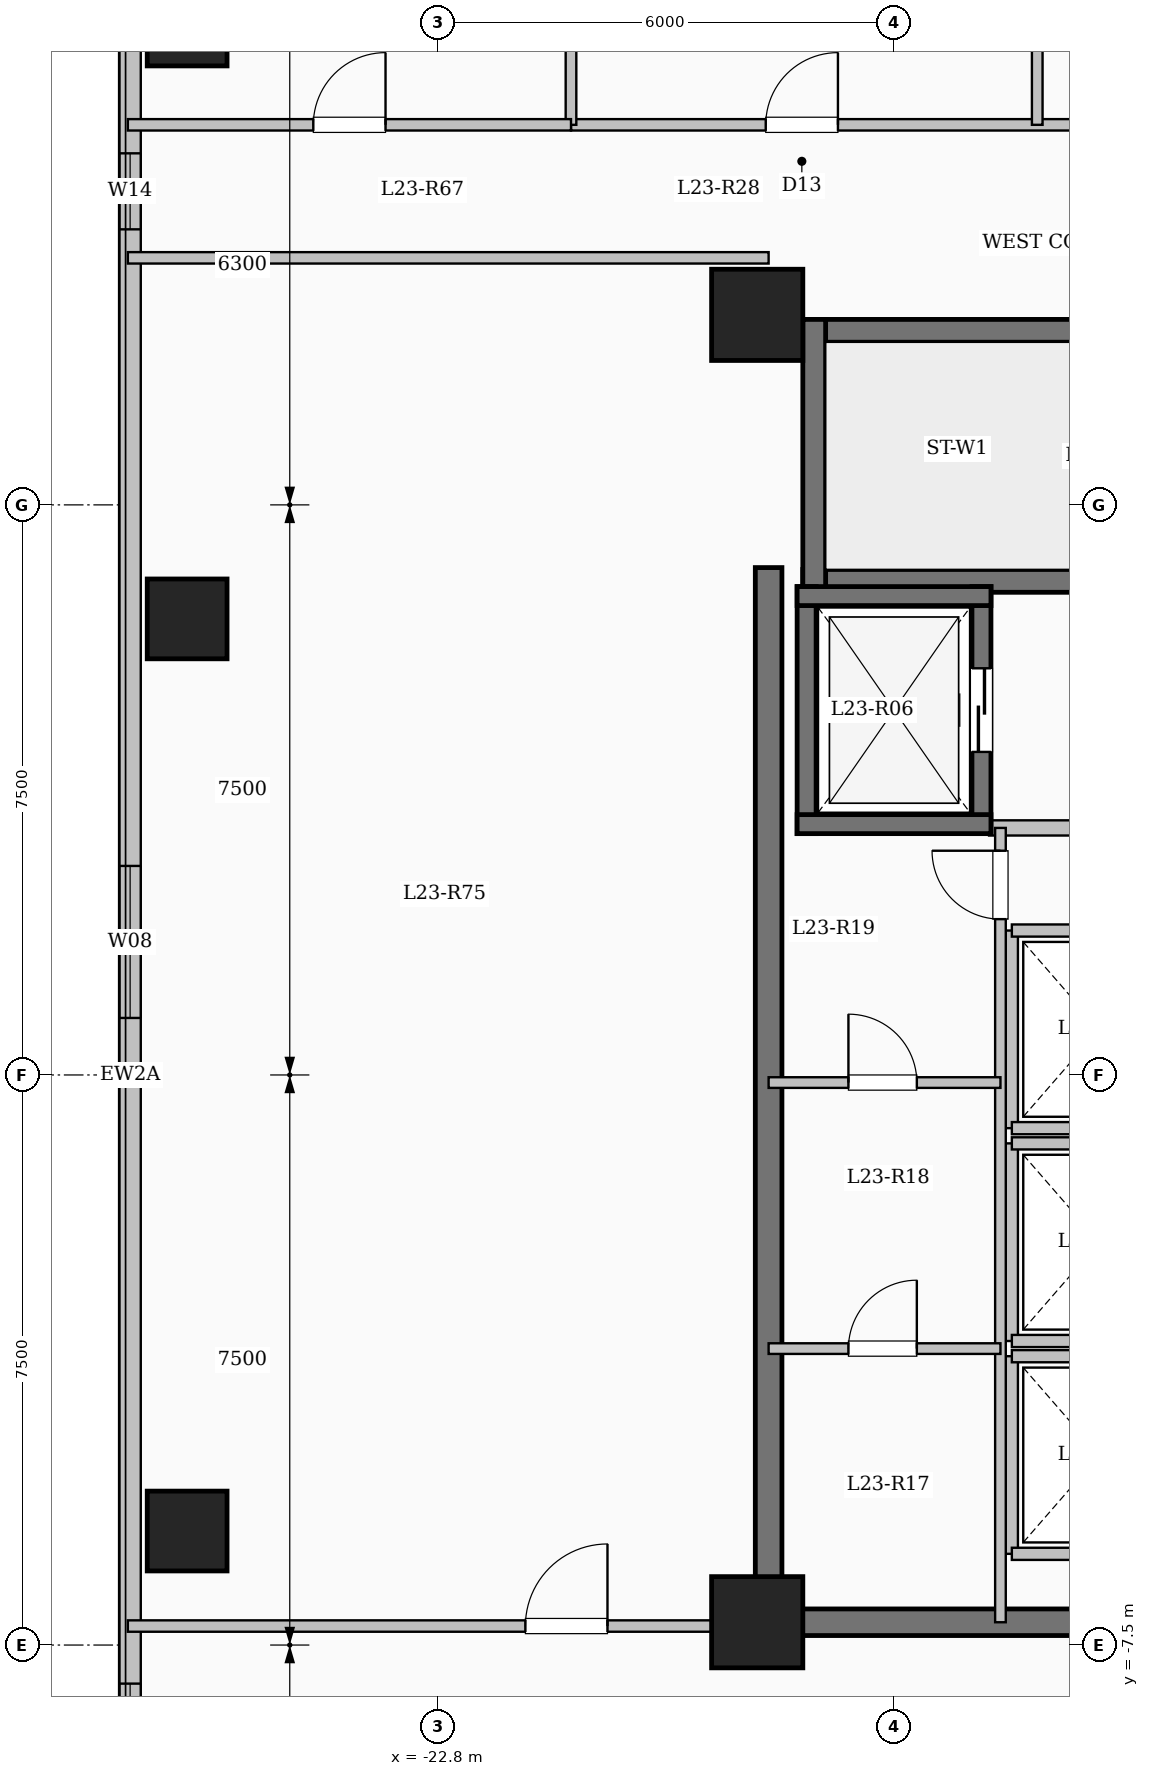
"""IFC4 building model, lengths in metres.
Left out: names, types, materials, properties, quantities, classifications, styles, units other than length and angle.
Written with IfcOpenShell. Run it as: python <this file> out.ifc"""

import sys

from ifc_helpers import new_model, si_unit, direction, frame, frame_2d, origin, origin_2d, place, context, subcontext, project, spatial, rectangle, extrude, element, fill, save


model = new_model("IFC4")
c1 = context("Model", 3, precision=1e-05, world=origin(), true_north=direction((0.0, 1.0)))
c2 = subcontext(c1, "Body", "Model", "MODEL_VIEW")
j1 = project(units=[si_unit("LENGTHUNIT", "METRE"), si_unit("PLANEANGLEUNIT", "RADIAN")], contexts=[c1])
p1 = place(None, origin())
s1 = spatial("IfcSite", under=j1, at=p1, CompositionType="ELEMENT")
p2 = place(p1, origin())
s2 = spatial("IfcBuilding", under=s1, at=p2, CompositionType="ELEMENT")
p3 = place(p2, frame((0.0, 0.0, 88.35)))
s3 = spatial("IfcBuildingStorey", under=s2, at=p3, CompositionType="ELEMENT", Elevation=88.35)
for number, where, z_axis, x_axis in (
    (1, (-18.6, -7.2, 0.0), (0.0, 0.0, 1.0), (1.0, 0.0, 0.0)),
    (2, (-18.6, 10.0, 0.0), (0.0, 0.0, 1.0), (1.0, 0.0, 0.0)),
):
    element("IfcColumn", number, at=place(p3, frame(where, z_axis=z_axis, x_axis=x_axis)), inside=s3, PredefinedType="COLUMN", context=c2, shape_type="SweptSolid", body=[
        extrude(rectangle(XDim=1.2, YDim=1.2, at=origin_2d()), origin(), (0.0, 0.0, 1.0), 3.35),
    ])
for number, where, z_axis, x_axis in (
    (3, (-26.1, -6.0, 0.0), (0.0, 0.0, 1.0), (1.0, 0.0, 0.0)),
    (4, (-26.1, 6.0, 0.0), (0.0, 0.0, 1.0), (1.0, 0.0, 0.0)),
    (5, (-26.1, 13.8, 0.0), (0.0, 0.0, 1.0), (1.0, 0.0, 0.0)),
):
    element("IfcColumn", number, at=place(p3, frame(where, z_axis=z_axis, x_axis=x_axis)), inside=s3, PredefinedType="COLUMN", context=c2, shape_type="SweptSolid", body=[
        extrude(rectangle(XDim=1.05, YDim=1.05, at=origin_2d()), origin(), (0.0, 0.0, 1.0), 3.35),
    ])
p4 = place(p3, frame((-26.85, -17.85, 0.0), z_axis=(0.0, 0.0, 1.0), x_axis=(0.0, 1.0, 0.0)))
e6 = element("IfcWall", 6, at=p4, inside=s3, PredefinedType="SOLIDWALL", context=c2, shape_type="SweptSolid", body=[
    extrude(rectangle(XDim=35.7, YDim=0.28, at=frame_2d((17.85, 0.0))), origin(), (0.0, 0.0, 1.0), 3.1),
])
p5 = place(p4, frame((2.55, 0.0, 0.9)))
e7 = element("IfcOpeningElement", 7, at=p5, cuts=e6, PredefinedType="OPENING", context=c2, shape_type="SweptSolid", body=[
    extrude(rectangle(XDim=2.4, YDim=1.8, at=frame_2d((1.2, 0.9))), frame((0.0, 0.15, 0.0), z_axis=(0.0, -1.0, 0.0), x_axis=(1.0, 0.0, 0.0)), (0.0, 0.0, 1.0), 0.3),
])
p6 = place(p4, frame((8.343, 0.0, 0.9)))
e8 = element("IfcOpeningElement", 8, at=p6, cuts=e6, PredefinedType="OPENING", context=c2, shape_type="SweptSolid", body=[
    extrude(rectangle(XDim=1.5, YDim=1.65, at=frame_2d((0.75, 0.825))), frame((0.0, 0.15, 0.0), z_axis=(0.0, -1.0, 0.0), x_axis=(1.0, 0.0, 0.0)), (0.0, 0.0, 1.0), 0.3),
])
p7 = place(p4, frame((18.6, 0.0, 0.9)))
e9 = element("IfcOpeningElement", 9, at=p7, cuts=e6, PredefinedType="OPENING", context=c2, shape_type="SweptSolid", body=[
    extrude(rectangle(XDim=2.0, YDim=1.7, at=frame_2d((1.0, 0.85))), frame((0.0, 0.15, 0.0), z_axis=(0.0, -1.0, 0.0), x_axis=(1.0, 0.0, 0.0)), (0.0, 0.0, 1.0), 0.3),
])
p8 = place(p4, frame((28.975, 0.0, 0.95)))
e10 = element("IfcOpeningElement", 10, at=p8, cuts=e6, PredefinedType="OPENING", context=c2, shape_type="SweptSolid", body=[
    extrude(rectangle(XDim=1.0, YDim=1.5, at=frame_2d((0.5, 0.75))), frame((0.0, 0.15, 0.0), z_axis=(0.0, -1.0, 0.0), x_axis=(1.0, 0.0, 0.0)), (0.0, 0.0, 1.0), 0.3),
])
p9 = place(p4, frame((32.025, 0.0, 0.9)))
e11 = element("IfcOpeningElement", 11, at=p9, cuts=e6, PredefinedType="OPENING", context=c2, shape_type="SweptSolid", body=[
    extrude(rectangle(XDim=2.0, YDim=1.7, at=frame_2d((1.0, 0.85))), frame((0.0, 0.15, 0.0), z_axis=(0.0, -1.0, 0.0), x_axis=(1.0, 0.0, 0.0)), (0.0, 0.0, 1.0), 0.3),
])
p10 = place(p3, frame((-18.0, 9.79, 0.0), z_axis=(0.0, 0.0, 1.0), x_axis=(1.0, 0.0, 0.0)))
e12 = element("IfcWall", 12, at=p10, inside=s3, PredefinedType="SHEAR", context=c2, shape_type="SweptSolid", body=[
    extrude(rectangle(XDim=8.0, YDim=0.3, at=frame_2d((4.0, 0.0))), origin(), (0.0, 0.0, 1.0), 3.35),
])
p11 = place(p3, frame((-18.0, 6.5, 0.0), z_axis=(0.0, 0.0, 1.0), x_axis=(1.0, 0.0, 0.0)))
e13 = element("IfcWall", 13, at=p11, inside=s3, PredefinedType="SHEAR", context=c2, shape_type="SweptSolid", body=[
    extrude(rectangle(XDim=8.0, YDim=0.3, at=frame_2d((4.0, 0.0))), origin(), (0.0, 0.0, 1.0), 3.35),
])
p12 = place(p11, frame((6.45, 0.0, 0.0)))
e14 = element("IfcOpeningElement", 14, at=p12, cuts=e13, PredefinedType="OPENING", context=c2, shape_type="SweptSolid", body=[
    extrude(rectangle(XDim=1.0, YDim=2.15, at=frame_2d((0.5, 1.075))), frame((0.0, 0.16, 0.0), z_axis=(0.0, -1.0, 0.0), x_axis=(1.0, 0.0, 0.0)), (0.0, 0.0, 1.0), 0.32),
])
p13 = place(p3, frame((-17.85, 6.35, 0.0), z_axis=(0.0, 0.0, 1.0), x_axis=(0.0, 1.0, 0.0)))
e15 = element("IfcWall", 15, at=p13, inside=s3, PredefinedType="SHEAR", context=c2, shape_type="SweptSolid", body=[
    extrude(rectangle(XDim=3.59, YDim=0.3, at=frame_2d((1.795, 0.0))), origin(), (0.0, 0.0, 1.0), 3.35),
])
p14 = place(p3, frame((-15.55, 3.25, 0.0), z_axis=(0.0, 0.0, 1.0), x_axis=(1.0, 0.0, 0.0)))
e16 = element("IfcWall", 16, at=p14, inside=s3, PredefinedType="SOLIDWALL", context=c2, shape_type="SweptSolid", body=[
    extrude(rectangle(XDim=5.4, YDim=0.2, at=frame_2d((2.7, 0.0))), origin(), (0.0, 0.0, 1.0), 3.1),
])
p15 = place(p3, frame((-17.95, 3.175, 0.0), z_axis=(0.0, 0.0, 1.0), x_axis=(0.0, 1.0, 0.0)))
e17 = element("IfcWall", 17, at=p15, inside=s3, PredefinedType="SHEAR", context=c2, shape_type="SweptSolid", body=[
    extrude(rectangle(XDim=3.25, YDim=0.25, at=frame_2d((1.625, 0.0))), origin(), (0.0, 0.0, 1.0), 3.35),
])
p16 = place(p3, frame((-15.65, 3.175, 0.0), z_axis=(0.0, 0.0, 1.0), x_axis=(0.0, 1.0, 0.0)))
e18 = element("IfcWall", 18, at=p16, inside=s3, PredefinedType="SHEAR", context=c2, shape_type="SweptSolid", body=[
    extrude(rectangle(XDim=3.25, YDim=0.25, at=frame_2d((1.625, 0.0))), origin(), (0.0, 0.0, 1.0), 3.35),
])
p17 = place(p16, frame((1.075, 0.0, 0.0)))
e19 = element("IfcOpeningElement", 19, at=p17, cuts=e18, PredefinedType="OPENING", context=c2, shape_type="SweptSolid", body=[
    extrude(rectangle(XDim=1.1, YDim=2.15, at=frame_2d((0.55, 1.075))), frame((0.0, 0.135, 0.0), z_axis=(0.0, -1.0, 0.0), x_axis=(1.0, 0.0, 0.0)), (0.0, 0.0, 1.0), 0.27),
])
for number, where, z_axis, x_axis in (
    (20, (-18.075, 3.3, 0.0), (0.0, 0.0, 1.0), (1.0, 0.0, 0.0)),
    (21, (-18.075, 6.3, 0.0), (0.0, 0.0, 1.0), (1.0, 0.0, 0.0)),
):
    element("IfcWall", number, at=place(p3, frame(where, z_axis=z_axis, x_axis=x_axis)), inside=s3, PredefinedType="SHEAR", context=c2, shape_type="SweptSolid", body=[
        extrude(rectangle(XDim=2.55, YDim=0.25, at=frame_2d((1.275, 0.0))), origin(), (0.0, 0.0, 1.0), 3.35),
    ])
p18 = place(p3, frame((-15.25, -6.3, 0.0), z_axis=(0.0, 0.0, 1.0), x_axis=(0.0, 1.0, 0.0)))
e22 = element("IfcWall", 22, at=p18, inside=s3, PredefinedType="SOLIDWALL", context=c2, shape_type="SweptSolid", body=[
    extrude(rectangle(XDim=2.6, YDim=0.16, at=frame_2d((1.3, 0.0))), origin(), (0.0, 0.0, 1.0), 3.1),
])
for number, where, z_axis, x_axis in (
    (23, (-15.25, -6.3, 0.0), (0.0, 0.0, 1.0), (1.0, 0.0, 0.0)),
    (24, (-15.25, -3.7, 0.0), (0.0, 0.0, 1.0), (1.0, 0.0, 0.0)),
):
    element("IfcWall", number, at=place(p3, frame(where, z_axis=z_axis, x_axis=x_axis)), inside=s3, PredefinedType="SOLIDWALL", context=c2, shape_type="SweptSolid", body=[
        extrude(rectangle(XDim=2.3, YDim=0.16, at=frame_2d((1.15, 0.0))), origin(), (0.0, 0.0, 1.0), 3.1),
    ])
p19 = place(p3, frame((-15.25, -3.5, 0.0), z_axis=(0.0, 0.0, 1.0), x_axis=(0.0, 1.0, 0.0)))
e25 = element("IfcWall", 25, at=p19, inside=s3, PredefinedType="SOLIDWALL", context=c2, shape_type="SweptSolid", body=[
    extrude(rectangle(XDim=2.6, YDim=0.16, at=frame_2d((1.3, 0.0))), origin(), (0.0, 0.0, 1.0), 3.1),
])
for number, where, z_axis, x_axis in (
    (26, (-15.25, -3.5, 0.0), (0.0, 0.0, 1.0), (1.0, 0.0, 0.0)),
    (27, (-15.25, -0.9, 0.0), (0.0, 0.0, 1.0), (1.0, 0.0, 0.0)),
):
    element("IfcWall", number, at=place(p3, frame(where, z_axis=z_axis, x_axis=x_axis)), inside=s3, PredefinedType="SOLIDWALL", context=c2, shape_type="SweptSolid", body=[
        extrude(rectangle(XDim=2.3, YDim=0.16, at=frame_2d((1.15, 0.0))), origin(), (0.0, 0.0, 1.0), 3.1),
    ])
p20 = place(p3, frame((-15.25, -0.7, 0.0), z_axis=(0.0, 0.0, 1.0), x_axis=(0.0, 1.0, 0.0)))
e28 = element("IfcWall", 28, at=p20, inside=s3, PredefinedType="SOLIDWALL", context=c2, shape_type="SweptSolid", body=[
    extrude(rectangle(XDim=2.6, YDim=0.16, at=frame_2d((1.3, 0.0))), origin(), (0.0, 0.0, 1.0), 3.1),
])
for number, where, z_axis, x_axis in (
    (29, (-15.25, -0.7, 0.0), (0.0, 0.0, 1.0), (1.0, 0.0, 0.0)),
    (30, (-15.25, 1.9, 0.0), (0.0, 0.0, 1.0), (1.0, 0.0, 0.0)),
):
    element("IfcWall", number, at=place(p3, frame(where, z_axis=z_axis, x_axis=x_axis)), inside=s3, PredefinedType="SOLIDWALL", context=c2, shape_type="SweptSolid", body=[
        extrude(rectangle(XDim=2.3, YDim=0.16, at=frame_2d((1.15, 0.0))), origin(), (0.0, 0.0, 1.0), 3.1),
    ])
p21 = place(p3, frame((-18.45, -7.375, 0.0), z_axis=(0.0, 0.0, 1.0), x_axis=(0.0, 1.0, 0.0)))
e31 = element("IfcWall", 31, at=p21, inside=s3, PredefinedType="SHEAR", context=c2, shape_type="SweptSolid", body=[
    extrude(rectangle(XDim=14.05, YDim=0.35, at=frame_2d((7.025, 0.0))), origin(), (0.0, 0.0, 1.0), 3.35),
])
p22 = place(p3, frame((-18.625, -7.2, 0.0), z_axis=(0.0, 0.0, 1.0), x_axis=(1.0, 0.0, 0.0)))
e32 = element("IfcWall", 32, at=p22, inside=s3, PredefinedType="SHEAR", context=c2, shape_type="SweptSolid", body=[
    extrude(rectangle(XDim=8.55, YDim=0.35, at=frame_2d((4.275, 0.0))), origin(), (0.0, 0.0, 1.0), 3.35),
])
p23 = place(p3, frame((-15.4, -7.2, 0.0), z_axis=(0.0, 0.0, 1.0), x_axis=(0.0, 1.0, 0.0)))
e33 = element("IfcWall", 33, at=p23, inside=s3, PredefinedType="PARTITIONING", context=c2, shape_type="SweptSolid", body=[
    extrude(rectangle(XDim=10.45, YDim=0.14, at=frame_2d((5.225, 0.0))), origin(), (0.0, 0.0, 1.0), 3.1),
])
p24 = place(p23, frame((9.25, 0.0, 0.0)))
e34 = element("IfcOpeningElement", 34, at=p24, cuts=e33, PredefinedType="OPENING", context=c2, shape_type="SweptSolid", body=[
    extrude(rectangle(XDim=0.9, YDim=2.08, at=frame_2d((0.45, 1.04))), frame((0.0, 0.08, 0.0), z_axis=(0.0, -1.0, 0.0), x_axis=(1.0, 0.0, 0.0)), (0.0, 0.0, 1.0), 0.16),
])
p25 = place(p3, frame((-18.45, -3.6, 0.0), z_axis=(0.0, 0.0, 1.0), x_axis=(1.0, 0.0, 0.0)))
e35 = element("IfcWall", 35, at=p25, inside=s3, PredefinedType="PARTITIONING", context=c2, shape_type="SweptSolid", body=[
    extrude(rectangle(XDim=3.05, YDim=0.14, at=frame_2d((1.525, 0.0))), origin(), (0.0, 0.0, 1.0), 3.1),
])
p26 = place(p25, frame((1.05, 0.0, 0.0)))
e36 = element("IfcOpeningElement", 36, at=p26, cuts=e35, PredefinedType="OPENING", context=c2, shape_type="SweptSolid", body=[
    extrude(rectangle(XDim=0.9, YDim=2.08, at=frame_2d((0.45, 1.04))), frame((0.0, 0.08, 0.0), z_axis=(0.0, -1.0, 0.0), x_axis=(1.0, 0.0, 0.0)), (0.0, 0.0, 1.0), 0.16),
])
p27 = place(p3, frame((-18.45, -0.1, 0.0), z_axis=(0.0, 0.0, 1.0), x_axis=(1.0, 0.0, 0.0)))
e37 = element("IfcWall", 37, at=p27, inside=s3, PredefinedType="PARTITIONING", context=c2, shape_type="SweptSolid", body=[
    extrude(rectangle(XDim=3.05, YDim=0.14, at=frame_2d((1.525, 0.0))), origin(), (0.0, 0.0, 1.0), 3.1),
])
p28 = place(p27, frame((1.05, 0.0, 0.0)))
e38 = element("IfcOpeningElement", 38, at=p28, cuts=e37, PredefinedType="OPENING", context=c2, shape_type="SweptSolid", body=[
    extrude(rectangle(XDim=0.9, YDim=2.08, at=frame_2d((0.45, 1.04))), frame((0.0, 0.08, 0.0), z_axis=(0.0, -1.0, 0.0), x_axis=(1.0, 0.0, 0.0)), (0.0, 0.0, 1.0), 0.16),
])
p29 = place(p3, frame((-21.05, 12.5, 0.0), z_axis=(0.0, 0.0, 1.0), x_axis=(1.0, 0.0, 0.0)))
e39 = element("IfcWall", 39, at=p29, inside=s3, PredefinedType="PARTITIONING", context=c2, shape_type="SweptSolid", body=[
    extrude(rectangle(XDim=17.2, YDim=0.15, at=frame_2d((8.6, 0.0))), origin(), (0.0, 0.0, 1.0), 3.1),
])
p30 = place(p29, frame((2.562, 0.0, 0.0)))
e40 = element("IfcOpeningElement", 40, at=p30, cuts=e39, PredefinedType="OPENING", context=c2, shape_type="SweptSolid", body=[
    extrude(rectangle(XDim=0.95, YDim=2.15, at=frame_2d((0.475, 1.075))), frame((0.0, 0.085, 0.0), z_axis=(0.0, -1.0, 0.0), x_axis=(1.0, 0.0, 0.0)), (0.0, 0.0, 1.0), 0.17),
])
p31 = place(p29, frame((8.726, 0.0, 0.0)))
e41 = element("IfcOpeningElement", 41, at=p31, cuts=e39, PredefinedType="OPENING", context=c2, shape_type="SweptSolid", body=[
    extrude(rectangle(XDim=0.95, YDim=2.15, at=frame_2d((0.475, 1.075))), frame((0.0, 0.085, 0.0), z_axis=(0.0, -1.0, 0.0), x_axis=(1.0, 0.0, 0.0)), (0.0, 0.0, 1.0), 0.17),
])
p32 = place(p29, frame((14.21, 0.0, 0.0)))
e42 = element("IfcOpeningElement", 42, at=p32, cuts=e39, PredefinedType="OPENING", context=c2, shape_type="SweptSolid", body=[
    extrude(rectangle(XDim=0.95, YDim=2.15, at=frame_2d((0.475, 1.075))), frame((0.0, 0.085, 0.0), z_axis=(0.0, -1.0, 0.0), x_axis=(1.0, 0.0, 0.0)), (0.0, 0.0, 1.0), 0.17),
])
p33 = place(p3, frame((-14.916, 12.5, 0.0), z_axis=(0.0, 0.0, 1.0), x_axis=(0.0, 1.0, 0.0)))
e43 = element("IfcWall", 43, at=p33, inside=s3, PredefinedType="PARTITIONING", context=c2, shape_type="SweptSolid", body=[
    extrude(rectangle(XDim=9.55, YDim=0.14, at=frame_2d((4.775, 0.0))), origin(), (0.0, 0.0, 1.0), 2.435),
])
p34 = place(p3, frame((-26.88, -7.25, 0.0), z_axis=(0.0, 0.0, 1.0), x_axis=(1.0, 0.0, 0.0)))
e44 = element("IfcWall", 44, at=p34, inside=s3, PredefinedType="PARTITIONING", context=c2, shape_type="SweptSolid", body=[
    extrude(rectangle(XDim=8.43, YDim=0.15, at=frame_2d((4.215, 0.0))), origin(), (0.0, 0.0, 1.0), 3.1),
])
p35 = place(p34, frame((5.23, 0.0, 0.0)))
e45 = element("IfcOpeningElement", 45, at=p35, cuts=e44, PredefinedType="OPENING", context=c2, shape_type="SweptSolid", body=[
    extrude(rectangle(XDim=1.08, YDim=2.15, at=frame_2d((0.54, 1.075))), frame((0.0, 0.085, 0.0), z_axis=(0.0, -1.0, 0.0), x_axis=(1.0, 0.0, 0.0)), (0.0, 0.0, 1.0), 0.17),
])
p36 = place(p3, frame((-26.88, 10.75, 0.0), z_axis=(0.0, 0.0, 1.0), x_axis=(1.0, 0.0, 0.0)))
e46 = element("IfcWall", 46, at=p36, inside=s3, PredefinedType="PARTITIONING", context=c2, shape_type="SweptSolid", body=[
    extrude(rectangle(XDim=8.43, YDim=0.15, at=frame_2d((4.215, 0.0))), origin(), (0.0, 0.0, 1.0), 3.1),
])
p37 = place(p3, frame((-21.05, 12.5, 0.0), z_axis=(0.0, 0.0, 1.0), x_axis=(0.0, 1.0, 0.0)))
e47 = element("IfcWall", 47, at=p37, inside=s3, PredefinedType="PARTITIONING", context=c2, shape_type="SweptSolid", body=[
    extrude(rectangle(XDim=5.35, YDim=0.14, at=frame_2d((2.675, 0.0))), origin(), (0.0, 0.0, 1.0), 3.1),
])
p38 = place(p3, frame((-26.88, 12.5, 0.0), z_axis=(0.0, 0.0, 1.0), x_axis=(1.0, 0.0, 0.0)))
e48 = element("IfcWall", 48, at=p38, inside=s3, PredefinedType="PARTITIONING", context=c2, shape_type="SweptSolid", body=[
    extrude(rectangle(XDim=5.83, YDim=0.15, at=frame_2d((2.915, 0.0))), origin(), (0.0, 0.0, 1.0), 3.1),
])
p39 = place(p38, frame((2.44, 0.0, 0.0)))
e49 = element("IfcOpeningElement", 49, at=p39, cuts=e48, PredefinedType="OPENING", context=c2, shape_type="SweptSolid", body=[
    extrude(rectangle(XDim=0.95, YDim=2.15, at=frame_2d((0.475, 1.075))), frame((0.0, 0.085, 0.0), z_axis=(0.0, -1.0, 0.0), x_axis=(1.0, 0.0, 0.0)), (0.0, 0.0, 1.0), 0.17),
])
p40 = place(p6, origin())
e50 = element("IfcWindow", 50, at=p40, inside=s3, PartitioningType="SINGLE_PANEL", PredefinedType="WINDOW", context=c2, shape_type="SweptSolid", body=[
    extrude(rectangle(XDim=1.5, YDim=1.65, at=frame_2d((0.75, 0.825))), frame((0.0, 0.03, 0.0), z_axis=(0.0, -1.0, 0.0), x_axis=(1.0, 0.0, 0.0)), (0.0, 0.0, 1.0), 0.06),
])
fill(e8, e50)
p41 = place(p7, origin())
e51 = element("IfcWindow", 51, at=p41, inside=s3, PartitioningType="SINGLE_PANEL", PredefinedType="WINDOW", context=c2, shape_type="SweptSolid", body=[
    extrude(rectangle(XDim=2.0, YDim=1.7, at=frame_2d((1.0, 0.85))), frame((0.0, 0.03, 0.0), z_axis=(0.0, -1.0, 0.0), x_axis=(1.0, 0.0, 0.0)), (0.0, 0.0, 1.0), 0.06),
])
fill(e9, e51)
p42 = place(p8, origin())
e52 = element("IfcWindow", 52, at=p42, inside=s3, PartitioningType="SINGLE_PANEL", PredefinedType="WINDOW", context=c2, shape_type="SweptSolid", body=[
    extrude(rectangle(XDim=1.0, YDim=1.5, at=frame_2d((0.5, 0.75))), frame((0.0, 0.03, 0.0), z_axis=(0.0, -1.0, 0.0), x_axis=(1.0, 0.0, 0.0)), (0.0, 0.0, 1.0), 0.06),
])
fill(e10, e52)
p43 = place(p17, origin())
e53 = element("IfcDoor", 53, at=p43, inside=s3, OperationType="SLIDING_TO_LEFT", PredefinedType="DOOR", context=c2, shape_type="SweptSolid", body=[
    extrude(rectangle(XDim=1.1, YDim=2.15, at=frame_2d((0.55, 1.075))), frame((0.0, 0.025, 0.0), z_axis=(0.0, -1.0, 0.0), x_axis=(1.0, 0.0, 0.0)), (0.0, 0.0, 1.0), 0.05),
])
fill(e19, e53)
p44 = place(p24, origin())
e54 = element("IfcDoor", 54, at=p44, inside=s3, OperationType="SINGLE_SWING_RIGHT", PredefinedType="DOOR", context=c2, shape_type="SweptSolid", body=[
    extrude(rectangle(XDim=0.9, YDim=2.08, at=frame_2d((0.45, 1.04))), frame((0.0, 0.025, 0.0), z_axis=(0.0, -1.0, 0.0), x_axis=(1.0, 0.0, 0.0)), (0.0, 0.0, 1.0), 0.05),
])
fill(e34, e54)
p45 = place(p28, origin())
e55 = element("IfcDoor", 55, at=p45, inside=s3, OperationType="SINGLE_SWING_LEFT", PredefinedType="DOOR", context=c2, shape_type="SweptSolid", body=[
    extrude(rectangle(XDim=0.9, YDim=2.08, at=frame_2d((0.45, 1.04))), frame((0.0, 0.025, 0.0), z_axis=(0.0, -1.0, 0.0), x_axis=(1.0, 0.0, 0.0)), (0.0, 0.0, 1.0), 0.05),
])
fill(e38, e55)
p46 = place(p26, origin())
e56 = element("IfcDoor", 56, at=p46, inside=s3, OperationType="SINGLE_SWING_RIGHT", PredefinedType="DOOR", context=c2, shape_type="SweptSolid", body=[
    extrude(rectangle(XDim=0.9, YDim=2.08, at=frame_2d((0.45, 1.04))), frame((0.0, 0.025, 0.0), z_axis=(0.0, -1.0, 0.0), x_axis=(1.0, 0.0, 0.0)), (0.0, 0.0, 1.0), 0.05),
])
fill(e36, e56)
p47 = place(p30, origin())
e57 = element("IfcDoor", 57, at=p47, inside=s3, OperationType="SINGLE_SWING_RIGHT", PredefinedType="DOOR", context=c2, shape_type="SweptSolid", body=[
    extrude(rectangle(XDim=0.95, YDim=2.15, at=frame_2d((0.475, 1.075))), frame((0.0, 0.025, 0.0), z_axis=(0.0, -1.0, 0.0), x_axis=(1.0, 0.0, 0.0)), (0.0, 0.0, 1.0), 0.05),
])
fill(e40, e57)
p48 = place(p39, origin())
e58 = element("IfcDoor", 58, at=p48, inside=s3, OperationType="SINGLE_SWING_RIGHT", PredefinedType="DOOR", context=c2, shape_type="SweptSolid", body=[
    extrude(rectangle(XDim=0.95, YDim=2.15, at=frame_2d((0.475, 1.075))), frame((0.0, 0.025, 0.0), z_axis=(0.0, -1.0, 0.0), x_axis=(1.0, 0.0, 0.0)), (0.0, 0.0, 1.0), 0.05),
])
fill(e49, e58)
p49 = place(p35, origin())
e59 = element("IfcDoor", 59, at=p49, inside=s3, OperationType="SINGLE_SWING_RIGHT", PredefinedType="DOOR", context=c2, shape_type="SweptSolid", body=[
    extrude(rectangle(XDim=1.08, YDim=2.15, at=frame_2d((0.54, 1.075))), frame((0.0, 0.025, 0.0), z_axis=(0.0, -1.0, 0.0), x_axis=(1.0, 0.0, 0.0)), (0.0, 0.0, 1.0), 0.05),
])
fill(e45, e59)
save(model, sys.argv[1])
